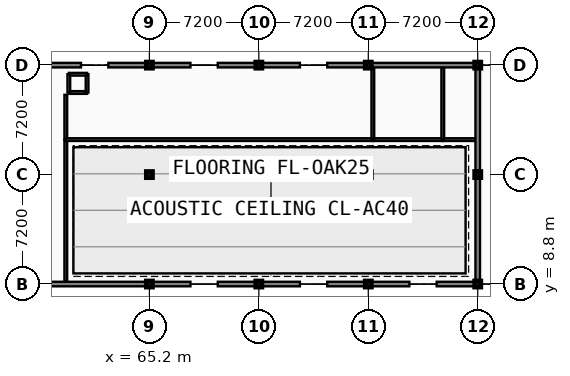
"""IFC4 building model, lengths in metres.
Left out: names, types, materials, properties, quantities, classifications, styles, units other than length and angle.
Written with IfcOpenShell. Run it as: python <this file> out.ifc"""

import sys

from ifc_helpers import new_model, si_unit, direction, frame, frame_2d, origin, origin_2d, place, context, subcontext, project, spatial, rectangle, extrude, element, fill, save


model = new_model("IFC4")
c1 = context("Model", 3, precision=1e-05, world=origin(), true_north=direction((0.0, 1.0)))
c2 = subcontext(c1, "Body", "Model", "MODEL_VIEW")
j1 = project(units=[si_unit("LENGTHUNIT", "METRE"), si_unit("PLANEANGLEUNIT", "RADIAN")], contexts=[c1])
p1 = place(None, origin())
s1 = spatial("IfcSite", under=j1, at=p1, CompositionType="ELEMENT")
p2 = place(p1, origin())
s2 = spatial("IfcBuilding", under=s1, at=p2, CompositionType="ELEMENT")
p3 = place(p2, frame((0.0, 0.0, 5.4)))
s3 = spatial("IfcBuildingStorey", under=s2, at=p3, CompositionType="ELEMENT", Elevation=5.4)
for number, where, z_axis, x_axis in (
    (1, (65.2, 8.8, 0.0), (0.0, 0.0, 1.0), (1.0, 0.0, 0.0)),
    (2, (65.2, 16.0, 0.0), (0.0, 0.0, 1.0), (1.0, 0.0, 0.0)),
    (3, (65.2, 23.2, 0.0), (0.0, 0.0, 1.0), (1.0, 0.0, 0.0)),
    (4, (72.4, 8.8, 0.0), (0.0, 0.0, 1.0), (1.0, 0.0, 0.0)),
    (5, (72.4, 16.0, 0.0), (0.0, 0.0, 1.0), (1.0, 0.0, 0.0)),
    (6, (72.4, 23.2, 0.0), (0.0, 0.0, 1.0), (1.0, 0.0, 0.0)),
    (7, (79.6, 8.8, 0.0), (0.0, 0.0, 1.0), (1.0, 0.0, 0.0)),
    (8, (79.6, 16.0, 0.0), (0.0, 0.0, 1.0), (1.0, 0.0, 0.0)),
    (9, (79.6, 23.2, 0.0), (0.0, 0.0, 1.0), (1.0, 0.0, 0.0)),
    (10, (86.8, 8.8, 0.0), (0.0, 0.0, 1.0), (1.0, 0.0, 0.0)),
    (11, (86.8, 16.0, 0.0), (0.0, 0.0, 1.0), (1.0, 0.0, 0.0)),
    (12, (86.8, 23.2, 0.0), (0.0, 0.0, 1.0), (1.0, 0.0, 0.0)),
):
    element("IfcColumn", number, at=place(p3, frame(where, z_axis=z_axis, x_axis=x_axis)), inside=s3, PredefinedType="COLUMN", context=c2, shape_type="SweptSolid", body=[
        extrude(rectangle(XDim=0.4, YDim=0.4, at=origin_2d()), origin(), (0.0, 0.0, 1.0), 4.2),
    ])
p4 = place(p3, frame((59.7, 8.96, 0.0), z_axis=(0.0, 0.0, 1.0), x_axis=(0.0, 1.0, 0.0)))
e13 = element("IfcWall", 13, at=p4, inside=s3, PredefinedType="PARTITIONING", context=c2, shape_type="SweptSolid", body=[
    extrude(rectangle(XDim=9.34, YDim=0.18, at=frame_2d((4.67, 0.0))), origin(), (0.0, 0.0, 1.0), 3.25),
])
p5 = place(p4, frame((3.87, 0.0, -0.01)))
e14 = element("IfcOpeningElement", 14, at=p5, cuts=e13, PredefinedType="OPENING", context=c2, shape_type="SweptSolid", body=[
    extrude(rectangle(XDim=1.6, YDim=2.21, at=frame_2d((0.8, 1.105))), frame((0.0, 0.1, 0.0), z_axis=(0.0, -1.0, 0.0), x_axis=(1.0, 0.0, 0.0)), (0.0, 0.0, 1.0), 0.2),
])
p6 = place(p3, frame((59.7, 18.3, 0.0), z_axis=(0.0, 0.0, 1.0), x_axis=(0.0, 1.0, 0.0)))
e15 = element("IfcWall", 15, at=p6, inside=s3, PredefinedType="PARTITIONING", context=c2, shape_type="SweptSolid", body=[
    extrude(rectangle(XDim=2.95, YDim=0.18, at=frame_2d((1.475, 0.0))), origin(), (0.0, 0.0, 1.0), 3.84),
])
p7 = place(p6, frame((0.975, 0.0, -0.01)))
e16 = element("IfcOpeningElement", 16, at=p7, cuts=e15, PredefinedType="OPENING", context=c2, shape_type="SweptSolid", body=[
    extrude(rectangle(XDim=1.0, YDim=2.16, at=frame_2d((0.5, 1.08))), frame((0.0, 0.1, 0.0), z_axis=(0.0, -1.0, 0.0), x_axis=(1.0, 0.0, 0.0)), (0.0, 0.0, 1.0), 0.2),
])
p8 = place(p3, frame((59.7, 18.3, 0.0), z_axis=(0.0, 0.0, 1.0), x_axis=(1.0, 0.0, 0.0)))
e17 = element("IfcWall", 17, at=p8, inside=s3, PredefinedType="PARTITIONING", context=c2, shape_type="SweptSolid", body=[
    extrude(rectangle(XDim=20.2, YDim=0.18, at=frame_2d((10.1, 0.0))), origin(), (0.0, 0.0, 1.0), 3.37),
])
p9 = place(p8, frame((7.68, 0.0, -0.01)))
e18 = element("IfcOpeningElement", 18, at=p9, cuts=e17, PredefinedType="OPENING", context=c2, shape_type="SweptSolid", body=[
    extrude(rectangle(XDim=1.0, YDim=2.16, at=frame_2d((0.5, 1.08))), frame((0.0, 0.1, 0.0), z_axis=(0.0, -1.0, 0.0), x_axis=(1.0, 0.0, 0.0)), (0.0, 0.0, 1.0), 0.2),
])
p10 = place(p3, frame((79.9, 18.3, 0.0), z_axis=(0.0, 0.0, 1.0), x_axis=(1.0, 0.0, 0.0)))
e19 = element("IfcWall", 19, at=p10, inside=s3, PredefinedType="PARTITIONING", context=c2, shape_type="SweptSolid", body=[
    extrude(rectangle(XDim=4.6, YDim=0.18, at=frame_2d((2.3, 0.0))), origin(), (0.0, 0.0, 1.0), 3.53),
])
p11 = place(p10, frame((1.8, 0.0, -0.01)))
e20 = element("IfcOpeningElement", 20, at=p11, cuts=e19, PredefinedType="OPENING", context=c2, shape_type="SweptSolid", body=[
    extrude(rectangle(XDim=1.0, YDim=2.16, at=frame_2d((0.5, 1.08))), frame((0.0, 0.1, 0.0), z_axis=(0.0, -1.0, 0.0), x_axis=(1.0, 0.0, 0.0)), (0.0, 0.0, 1.0), 0.2),
])
p12 = place(p3, frame((84.5, 18.3, 0.0), z_axis=(0.0, 0.0, 1.0), x_axis=(1.0, 0.0, 0.0)))
e21 = element("IfcWall", 21, at=p12, inside=s3, PredefinedType="PARTITIONING", context=c2, shape_type="SweptSolid", body=[
    extrude(rectangle(XDim=2.16, YDim=0.18, at=frame_2d((1.08, 0.0))), origin(), (0.0, 0.0, 1.0), 3.21),
])
p13 = place(p12, frame((0.605, 0.0, -0.01)))
e22 = element("IfcOpeningElement", 22, at=p13, cuts=e21, PredefinedType="OPENING", context=c2, shape_type="SweptSolid", body=[
    extrude(rectangle(XDim=0.95, YDim=2.16, at=frame_2d((0.475, 1.08))), frame((0.0, 0.1, 0.0), z_axis=(0.0, -1.0, 0.0), x_axis=(1.0, 0.0, 0.0)), (0.0, 0.0, 1.0), 0.2),
])
for number, where, z_axis, x_axis in (
    (23, (79.9, 18.3, 0.0), (0.0, 0.0, 1.0), (0.0, 1.0, 0.0)),
    (24, (84.5, 18.3, 0.0), (0.0, 0.0, 1.0), (0.0, 1.0, 0.0)),
):
    element("IfcWall", number, at=place(p3, frame(where, z_axis=z_axis, x_axis=x_axis)), inside=s3, PredefinedType="PARTITIONING", context=c2, shape_type="SweptSolid", body=[
        extrude(rectangle(XDim=4.76, YDim=0.18, at=frame_2d((2.38, 0.0))), origin(), (0.0, 0.0, 1.0), 3.52),
    ])
p14 = place(p3, frame((58.0, 8.8, 0.0), z_axis=(0.0, 0.0, 1.0), x_axis=(1.0, 0.0, 0.0)))
e25 = element("IfcWall", 25, at=p14, inside=s3, PredefinedType="SOLIDWALL", context=c2, shape_type="SweptSolid", body=[
    extrude(rectangle(XDim=7.2, YDim=0.3, at=frame_2d((3.6, 0.0))), origin(), (0.0, 0.0, 1.0), 3.37),
])
p15 = place(p14, frame((0.46, 0.0, 0.85)))
e26 = element("IfcOpeningElement", 26, at=p15, cuts=e25, PredefinedType="OPENING", context=c2, shape_type="SweptSolid", body=[
    extrude(rectangle(XDim=0.9, YDim=2.15, at=frame_2d((0.45, 1.075))), frame((0.0, 0.16, 0.0), z_axis=(0.0, -1.0, 0.0), x_axis=(1.0, 0.0, 0.0)), (0.0, 0.0, 1.0), 0.32),
])
p16 = place(p14, frame((5.66, 0.0, 0.85)))
e27 = element("IfcOpeningElement", 27, at=p16, cuts=e25, PredefinedType="OPENING", context=c2, shape_type="SweptSolid", body=[
    extrude(rectangle(XDim=0.9, YDim=2.15, at=frame_2d((0.45, 1.075))), frame((0.0, 0.16, 0.0), z_axis=(0.0, -1.0, 0.0), x_axis=(1.0, 0.0, 0.0)), (0.0, 0.0, 1.0), 0.32),
])
for number, where, z_axis, x_axis in (
    (28, (65.2, 8.8, 0.0), (0.0, 0.0, 1.0), (1.0, 0.0, 0.0)),
    (29, (69.7, 8.8, 0.0), (0.0, 0.0, 1.0), (1.0, 0.0, 0.0)),
):
    element("IfcWall", number, at=place(p3, frame(where, z_axis=z_axis, x_axis=x_axis)), inside=s3, PredefinedType="SOLIDWALL", context=c2, shape_type="SweptSolid", body=[
        extrude(rectangle(XDim=2.7, YDim=0.3, at=frame_2d((1.35, 0.0))), origin(), (0.0, 0.0, 1.0), 3.37),
    ])
for number, where, z_axis, x_axis in (
    (30, (72.4, 8.8, 0.0), (0.0, 0.0, 1.0), (1.0, 0.0, 0.0)),
    (31, (76.9, 8.8, 0.0), (0.0, 0.0, 1.0), (1.0, 0.0, 0.0)),
):
    element("IfcWall", number, at=place(p3, frame(where, z_axis=z_axis, x_axis=x_axis)), inside=s3, PredefinedType="SOLIDWALL", context=c2, shape_type="SweptSolid", body=[
        extrude(rectangle(XDim=2.7, YDim=0.3, at=frame_2d((1.35, 0.0))), origin(), (0.0, 0.0, 1.0), 3.37),
    ])
for number, where, z_axis, x_axis in (
    (32, (79.6, 8.8, 0.0), (0.0, 0.0, 1.0), (1.0, 0.0, 0.0)),
    (33, (84.1, 8.8, 0.0), (0.0, 0.0, 1.0), (1.0, 0.0, 0.0)),
):
    element("IfcWall", number, at=place(p3, frame(where, z_axis=z_axis, x_axis=x_axis)), inside=s3, PredefinedType="SOLIDWALL", context=c2, shape_type="SweptSolid", body=[
        extrude(rectangle(XDim=2.7, YDim=0.3, at=frame_2d((1.35, 0.0))), origin(), (0.0, 0.0, 1.0), 3.21),
    ])
for number, where, z_axis, x_axis in (
    (34, (65.2, 23.2, 0.0), (0.0, 0.0, 1.0), (-1.0, 0.0, 0.0)),
    (35, (60.7, 23.2, 0.0), (0.0, 0.0, 1.0), (-1.0, 0.0, 0.0)),
    (36, (72.4, 23.2, 0.0), (0.0, 0.0, 1.0), (-1.0, 0.0, 0.0)),
    (37, (67.9, 23.2, 0.0), (0.0, 0.0, 1.0), (-1.0, 0.0, 0.0)),
):
    element("IfcWall", number, at=place(p3, frame(where, z_axis=z_axis, x_axis=x_axis)), inside=s3, PredefinedType="SOLIDWALL", context=c2, shape_type="SweptSolid", body=[
        extrude(rectangle(XDim=2.7, YDim=0.3, at=frame_2d((1.35, 0.0))), origin(), (0.0, 0.0, 1.0), 3.37),
    ])
for number, where, z_axis, x_axis in (
    (38, (79.6, 23.2, 0.0), (0.0, 0.0, 1.0), (-1.0, 0.0, 0.0)),
    (39, (75.1, 23.2, 0.0), (0.0, 0.0, 1.0), (-1.0, 0.0, 0.0)),
):
    element("IfcWall", number, at=place(p3, frame(where, z_axis=z_axis, x_axis=x_axis)), inside=s3, PredefinedType="SOLIDWALL", context=c2, shape_type="SweptSolid", body=[
        extrude(rectangle(XDim=2.7, YDim=0.3, at=frame_2d((1.35, 0.0))), origin(), (0.0, 0.0, 1.0), 3.37),
    ])
p17 = place(p3, frame((86.8, 23.2, 0.0), z_axis=(0.0, 0.0, 1.0), x_axis=(-1.0, 0.0, 0.0)))
e40 = element("IfcWall", 40, at=p17, inside=s3, PredefinedType="SOLIDWALL", context=c2, shape_type="SweptSolid", body=[
    extrude(rectangle(XDim=7.2, YDim=0.3, at=frame_2d((3.6, 0.0))), origin(), (0.0, 0.0, 1.0), 3.21),
])
p18 = place(p17, frame((0.46, 0.0, 0.85)))
e41 = element("IfcOpeningElement", 41, at=p18, cuts=e40, PredefinedType="OPENING", context=c2, shape_type="SweptSolid", body=[
    extrude(rectangle(XDim=0.9, YDim=2.15, at=frame_2d((0.45, 1.075))), frame((0.0, 0.16, 0.0), z_axis=(0.0, -1.0, 0.0), x_axis=(1.0, 0.0, 0.0)), (0.0, 0.0, 1.0), 0.32),
])
p19 = place(p17, frame((5.66, 0.0, 0.85)))
e42 = element("IfcOpeningElement", 42, at=p19, cuts=e40, PredefinedType="OPENING", context=c2, shape_type="SweptSolid", body=[
    extrude(rectangle(XDim=0.9, YDim=2.15, at=frame_2d((0.45, 1.075))), frame((0.0, 0.16, 0.0), z_axis=(0.0, -1.0, 0.0), x_axis=(1.0, 0.0, 0.0)), (0.0, 0.0, 1.0), 0.32),
])
p20 = place(p3, frame((86.8, 8.8, 0.0), z_axis=(0.0, 0.0, 1.0), x_axis=(0.0, 1.0, 0.0)))
e43 = element("IfcWall", 43, at=p20, inside=s3, PredefinedType="SOLIDWALL", context=c2, shape_type="SweptSolid", body=[
    extrude(rectangle(XDim=7.2, YDim=0.3, at=frame_2d((3.6, 0.0))), origin(), (0.0, 0.0, 1.0), 3.21),
])
p21 = place(p20, frame((3.0, 0.0, -0.01)))
e44 = element("IfcOpeningElement", 44, at=p21, cuts=e43, PredefinedType="OPENING", context=c2, shape_type="SweptSolid", body=[
    extrude(rectangle(XDim=1.2, YDim=2.21, at=frame_2d((0.6, 1.105))), frame((0.0, 0.16, 0.0), z_axis=(0.0, -1.0, 0.0), x_axis=(1.0, 0.0, 0.0)), (0.0, 0.0, 1.0), 0.32),
])
p22 = place(p3, frame((86.8, 16.0, 0.0), z_axis=(0.0, 0.0, 1.0), x_axis=(0.0, 1.0, 0.0)))
e45 = element("IfcWall", 45, at=p22, inside=s3, PredefinedType="SOLIDWALL", context=c2, shape_type="SweptSolid", body=[
    extrude(rectangle(XDim=7.2, YDim=0.3, at=frame_2d((3.6, 0.0))), origin(), (0.0, 0.0, 1.0), 3.21),
])
p23 = place(p22, frame((0.46, 0.0, 0.85)))
e46 = element("IfcOpeningElement", 46, at=p23, cuts=e45, PredefinedType="OPENING", context=c2, shape_type="SweptSolid", body=[
    extrude(rectangle(XDim=0.9, YDim=2.15, at=frame_2d((0.45, 1.075))), frame((0.0, 0.16, 0.0), z_axis=(0.0, -1.0, 0.0), x_axis=(1.0, 0.0, 0.0)), (0.0, 0.0, 1.0), 0.32),
])
p24 = place(p22, frame((5.66, 0.0, 0.85)))
e47 = element("IfcOpeningElement", 47, at=p24, cuts=e45, PredefinedType="OPENING", context=c2, shape_type="SweptSolid", body=[
    extrude(rectangle(XDim=0.9, YDim=2.15, at=frame_2d((0.45, 1.075))), frame((0.0, 0.16, 0.0), z_axis=(0.0, -1.0, 0.0), x_axis=(1.0, 0.0, 0.0)), (0.0, 0.0, 1.0), 0.32),
])
for number, where, z_axis, x_axis in (
    (48, (59.9, 21.4, 0.0), (0.0, 0.0, 1.0), (1.0, 0.0, 0.0)),
    (49, (61.1, 21.4, 0.0), (0.0, 0.0, 1.0), (0.0, 1.0, 0.0)),
    (50, (61.1, 22.6, 0.0), (0.0, 0.0, 1.0), (-1.0, 0.0, 0.0)),
):
    element("IfcWall", number, at=place(p3, frame(where, z_axis=z_axis, x_axis=x_axis)), inside=s3, PredefinedType="SOLIDWALL", context=c2, shape_type="SweptSolid", body=[
        extrude(rectangle(XDim=1.2, YDim=0.18, at=frame_2d((0.6, 0.0))), origin(), (0.0, 0.0, 1.0), 3.97),
    ])
p25 = place(p3, frame((59.9, 22.6, 0.0), z_axis=(0.0, 0.0, 1.0), x_axis=(0.0, -1.0, 0.0)))
e51 = element("IfcWall", 51, at=p25, inside=s3, PredefinedType="SOLIDWALL", context=c2, shape_type="SweptSolid", body=[
    extrude(rectangle(XDim=1.2, YDim=0.18, at=frame_2d((0.6, 0.0))), origin(), (0.0, 0.0, 1.0), 3.97),
])
p26 = place(p25, frame((0.2, 0.0, -0.01)))
e52 = element("IfcOpeningElement", 52, at=p26, cuts=e51, PredefinedType="OPENING", context=c2, shape_type="SweptSolid", body=[
    extrude(rectangle(XDim=0.8, YDim=2.06, at=frame_2d((0.4, 1.03))), frame((0.0, 0.1, 0.0), z_axis=(0.0, -1.0, 0.0), x_axis=(1.0, 0.0, 0.0)), (0.0, 0.0, 1.0), 0.2),
])
p27 = place(p5, frame((0.0, 0.0, 0.01)))
e53 = element("IfcDoor", 53, at=p27, inside=s3, OperationType="DOUBLE_SWING_LEFT", PredefinedType="DOOR", context=c2, shape_type="SweptSolid", body=[
    extrude(rectangle(XDim=1.6, YDim=2.2, at=frame_2d((0.8, 1.1))), frame((0.0, 0.025, 0.0), z_axis=(0.0, -1.0, 0.0), x_axis=(1.0, 0.0, 0.0)), (0.0, 0.0, 1.0), 0.05),
])
fill(e14, e53)
p28 = place(p7, frame((0.0, 0.0, 0.01)))
e54 = element("IfcDoor", 54, at=p28, inside=s3, OperationType="SINGLE_SWING_RIGHT", PredefinedType="DOOR", context=c2, shape_type="SweptSolid", body=[
    extrude(rectangle(XDim=1.0, YDim=2.15, at=frame_2d((0.5, 1.075))), frame((0.0, 0.025, 0.0), z_axis=(0.0, -1.0, 0.0), x_axis=(1.0, 0.0, 0.0)), (0.0, 0.0, 1.0), 0.05),
])
fill(e16, e54)
p29 = place(p9, frame((1.0, 0.0, 0.01), z_axis=(0.0, 0.0, 1.0), x_axis=(-1.0, 0.0, 0.0)))
e55 = element("IfcDoor", 55, at=p29, inside=s3, OperationType="SINGLE_SWING_LEFT", PredefinedType="DOOR", context=c2, shape_type="SweptSolid", body=[
    extrude(rectangle(XDim=1.0, YDim=2.15, at=frame_2d((0.5, 1.075))), frame((0.0, 0.025, 0.0), z_axis=(0.0, -1.0, 0.0), x_axis=(1.0, 0.0, 0.0)), (0.0, 0.0, 1.0), 0.05),
])
fill(e18, e55)
p30 = place(p11, frame((0.0, 0.0, 0.01)))
e56 = element("IfcDoor", 56, at=p30, inside=s3, OperationType="SINGLE_SWING_RIGHT", PredefinedType="DOOR", context=c2, shape_type="SweptSolid", body=[
    extrude(rectangle(XDim=1.0, YDim=2.15, at=frame_2d((0.5, 1.075))), frame((0.0, 0.025, 0.0), z_axis=(0.0, -1.0, 0.0), x_axis=(1.0, 0.0, 0.0)), (0.0, 0.0, 1.0), 0.05),
])
fill(e20, e56)
p31 = place(p13, frame((0.0, 0.0, 0.01)))
e57 = element("IfcDoor", 57, at=p31, inside=s3, OperationType="SINGLE_SWING_LEFT", PredefinedType="DOOR", context=c2, shape_type="SweptSolid", body=[
    extrude(rectangle(XDim=0.95, YDim=2.15, at=frame_2d((0.475, 1.075))), frame((0.0, 0.025, 0.0), z_axis=(0.0, -1.0, 0.0), x_axis=(1.0, 0.0, 0.0)), (0.0, 0.0, 1.0), 0.05),
])
fill(e22, e57)
p32 = place(p15, origin())
e58 = element("IfcWindow", 58, at=p32, inside=s3, PartitioningType="SINGLE_PANEL", PredefinedType="WINDOW", context=c2, shape_type="SweptSolid", body=[
    extrude(rectangle(XDim=0.9, YDim=2.15, at=frame_2d((0.45, 1.075))), frame((0.0, 0.03, 0.0), z_axis=(0.0, -1.0, 0.0), x_axis=(1.0, 0.0, 0.0)), (0.0, 0.0, 1.0), 0.06),
])
fill(e26, e58)
p33 = place(p16, origin())
e59 = element("IfcWindow", 59, at=p33, inside=s3, PartitioningType="SINGLE_PANEL", PredefinedType="WINDOW", context=c2, shape_type="SweptSolid", body=[
    extrude(rectangle(XDim=0.9, YDim=2.15, at=frame_2d((0.45, 1.075))), frame((0.0, 0.03, 0.0), z_axis=(0.0, -1.0, 0.0), x_axis=(1.0, 0.0, 0.0)), (0.0, 0.0, 1.0), 0.06),
])
fill(e27, e59)
p34 = place(p18, origin())
e60 = element("IfcWindow", 60, at=p34, inside=s3, PartitioningType="SINGLE_PANEL", PredefinedType="WINDOW", context=c2, shape_type="SweptSolid", body=[
    extrude(rectangle(XDim=0.9, YDim=2.15, at=frame_2d((0.45, 1.075))), frame((0.0, 0.03, 0.0), z_axis=(0.0, -1.0, 0.0), x_axis=(1.0, 0.0, 0.0)), (0.0, 0.0, 1.0), 0.06),
])
fill(e41, e60)
p35 = place(p19, origin())
e61 = element("IfcWindow", 61, at=p35, inside=s3, PartitioningType="SINGLE_PANEL", PredefinedType="WINDOW", context=c2, shape_type="SweptSolid", body=[
    extrude(rectangle(XDim=0.9, YDim=2.15, at=frame_2d((0.45, 1.075))), frame((0.0, 0.03, 0.0), z_axis=(0.0, -1.0, 0.0), x_axis=(1.0, 0.0, 0.0)), (0.0, 0.0, 1.0), 0.06),
])
fill(e42, e61)
p36 = place(p21, frame((0.0, 0.0, 0.01)))
e62 = element("IfcDoor", 62, at=p36, inside=s3, OperationType="SINGLE_SWING_LEFT", PredefinedType="DOOR", context=c2, shape_type="SweptSolid", body=[
    extrude(rectangle(XDim=1.2, YDim=2.2, at=frame_2d((0.6, 1.1))), frame((0.0, 0.025, 0.0), z_axis=(0.0, -1.0, 0.0), x_axis=(1.0, 0.0, 0.0)), (0.0, 0.0, 1.0), 0.05),
])
fill(e44, e62)
p37 = place(p23, origin())
e63 = element("IfcWindow", 63, at=p37, inside=s3, PartitioningType="SINGLE_PANEL", PredefinedType="WINDOW", context=c2, shape_type="SweptSolid", body=[
    extrude(rectangle(XDim=0.9, YDim=2.15, at=frame_2d((0.45, 1.075))), frame((0.0, 0.03, 0.0), z_axis=(0.0, -1.0, 0.0), x_axis=(1.0, 0.0, 0.0)), (0.0, 0.0, 1.0), 0.06),
])
fill(e46, e63)
p38 = place(p24, origin())
e64 = element("IfcWindow", 64, at=p38, inside=s3, PartitioningType="SINGLE_PANEL", PredefinedType="WINDOW", context=c2, shape_type="SweptSolid", body=[
    extrude(rectangle(XDim=0.9, YDim=2.15, at=frame_2d((0.45, 1.075))), frame((0.0, 0.03, 0.0), z_axis=(0.0, -1.0, 0.0), x_axis=(1.0, 0.0, 0.0)), (0.0, 0.0, 1.0), 0.06),
])
fill(e47, e64)
p39 = place(p26, frame((0.0, 0.0, 0.01)))
e65 = element("IfcDoor", 65, at=p39, inside=s3, OperationType="SINGLE_SWING_RIGHT", PredefinedType="DOOR", context=c2, shape_type="SweptSolid", body=[
    extrude(rectangle(XDim=0.8, YDim=2.05, at=frame_2d((0.4, 1.025))), frame((0.0, 0.025, 0.0), z_axis=(0.0, -1.0, 0.0), x_axis=(1.0, 0.0, 0.0)), (0.0, 0.0, 1.0), 0.05),
])
fill(e52, e65)
save(model, sys.argv[1])
